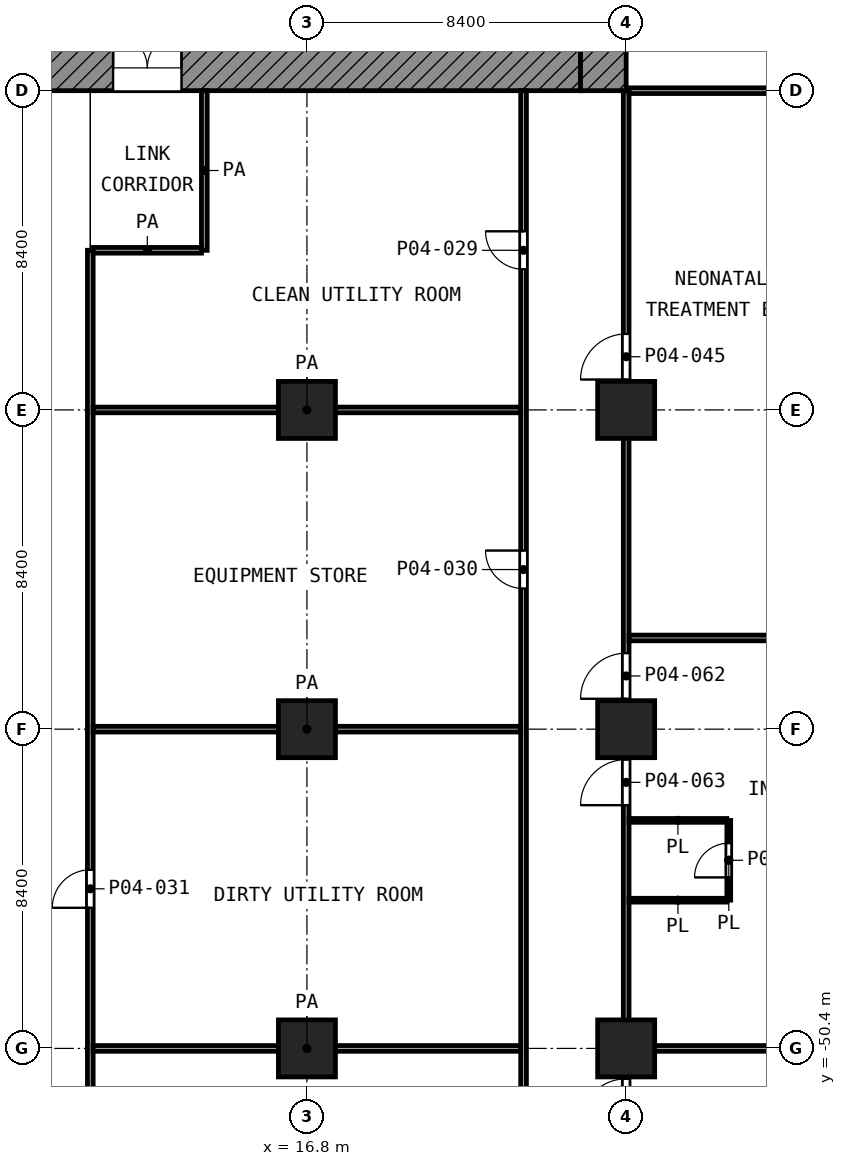
"""IFC4 building model, lengths in metres.
Left out: names, types, materials, properties, quantities, classifications, styles, units other than length and angle.
Written with IfcOpenShell. Run it as: python <this file> out.ifc"""

import sys

from ifc_helpers import new_model, si_unit, direction, frame, frame_2d, origin, origin_2d, place, context, subcontext, project, spatial, rectangle, extrude, element, fill, save


model = new_model("IFC4")
c1 = context("Model", 3, precision=1e-05, world=origin(), true_north=direction((0.0, 1.0)))
c2 = subcontext(c1, "Body", "Model", "MODEL_VIEW")
j1 = project(units=[si_unit("LENGTHUNIT", "METRE"), si_unit("PLANEANGLEUNIT", "RADIAN")], contexts=[c1])
p1 = place(None, origin())
s1 = spatial("IfcSite", under=j1, at=p1, CompositionType="ELEMENT")
p2 = place(p1, origin())
s2 = spatial("IfcBuilding", under=s1, at=p2, CompositionType="ELEMENT")
p3 = place(p2, frame((0.0, 0.0, 18.2)))
s3 = spatial("IfcBuildingStorey", under=s2, at=p3, CompositionType="ELEMENT", Elevation=18.2)
for number, where, z_axis, x_axis in (
    (1, (16.8, -33.6, 0.0), (0.0, 0.0, 1.0), (1.0, 0.0, 0.0)),
    (2, (25.2, -33.6, 0.0), (0.0, 0.0, 1.0), (1.0, 0.0, 0.0)),
    (3, (16.8, -42.0, 0.0), (0.0, 0.0, 1.0), (1.0, 0.0, 0.0)),
    (4, (25.2, -42.0, 0.0), (0.0, 0.0, 1.0), (1.0, 0.0, 0.0)),
    (5, (16.8, -50.4, 0.0), (0.0, 0.0, 1.0), (1.0, 0.0, 0.0)),
    (6, (25.2, -50.4, 0.0), (0.0, 0.0, 1.0), (1.0, 0.0, 0.0)),
):
    element("IfcColumn", number, at=place(p3, frame(where, z_axis=z_axis, x_axis=x_axis)), inside=s3, PredefinedType="COLUMN", context=c2, shape_type="SweptSolid", body=[
        extrude(rectangle(XDim=1.5, YDim=1.5, at=origin_2d()), origin(), (0.0, 0.0, 1.0), 5.6),
    ])
p4 = place(p3, frame((5.4, -24.6, 0.0), z_axis=(0.0, 0.0, 1.0), x_axis=(1.0, 0.0, 0.0)))
e7 = element("IfcWall", 7, at=p4, inside=s3, PredefinedType="SHEAR", context=c2, shape_type="SweptSolid", body=[
    extrude(rectangle(XDim=18.6, YDim=1.2, at=frame_2d((9.3, 0.0))), origin(), (0.0, 0.0, 1.0), 5.05),
])
p5 = place(p4, frame((6.3, 0.0, 0.0)))
e8 = element("IfcOpeningElement", 8, at=p5, cuts=e7, PredefinedType="OPENING", context=c2, shape_type="SweptSolid", body=[
    extrude(rectangle(XDim=1.8, YDim=2.1, at=frame_2d((0.9, 1.05))), frame((0.0, 0.61, 0.0), z_axis=(0.0, -1.0, 0.0), x_axis=(1.0, 0.0, 0.0)), (0.0, 0.0, 1.0), 1.22),
])
p6 = place(p3, frame((24.6, -25.2, 0.0), z_axis=(0.0, 0.0, 1.0), x_axis=(0.0, 1.0, 0.0)))
e9 = element("IfcWall", 9, at=p6, inside=s3, PredefinedType="SHEAR", context=c2, shape_type="SweptSolid", body=[
    extrude(rectangle(XDim=1.2, YDim=1.2, at=frame_2d((0.6, 0.0))), origin(), (0.0, 0.0, 1.0), 5.05),
])
p7 = place(p3, frame((25.275, -46.5, 0.0), z_axis=(0.0, 0.0, 1.0), x_axis=(1.0, 0.0, 0.0)))
e10 = element("IfcWall", 10, at=p7, inside=s3, PredefinedType="PARTITIONING", context=c2, shape_type="SweptSolid", body=[
    extrude(rectangle(XDim=2.574, YDim=0.1, at=frame_2d((1.287, 0.0))), origin(), (0.0, 0.0, 1.0), 5.05),
])
p8 = place(p3, frame((25.275, -44.4, 0.0), z_axis=(0.0, 0.0, 1.0), x_axis=(1.0, 0.0, 0.0)))
e11 = element("IfcWall", 11, at=p8, inside=s3, PredefinedType="PARTITIONING", context=c2, shape_type="SweptSolid", body=[
    extrude(rectangle(XDim=2.573, YDim=0.1, at=frame_2d((1.287, 0.0))), origin(), (0.0, 0.0, 1.0), 5.05),
])
p9 = place(p3, frame((27.9, -46.498, 0.0), z_axis=(0.0, 0.0, 1.0), x_axis=(0.0, 1.0, 0.0)))
e12 = element("IfcWall", 12, at=p9, inside=s3, PredefinedType="PARTITIONING", context=c2, shape_type="SweptSolid", body=[
    extrude(rectangle(XDim=2.096, YDim=0.1, at=frame_2d((1.048, 0.0))), origin(), (0.0, 0.0, 1.0), 5.05),
])
p10 = place(p9, frame((0.598, 0.0, 0.0)))
e13 = element("IfcOpeningElement", 13, at=p10, cuts=e12, PredefinedType="OPENING", context=c2, shape_type="SweptSolid", body=[
    extrude(rectangle(XDim=0.9, YDim=2.1, at=frame_2d((0.45, 1.05))), frame((0.0, 0.06, 0.0), z_axis=(0.0, -1.0, 0.0), x_axis=(1.0, 0.0, 0.0)), (0.0, 0.0, 1.0), 0.12),
])
p11 = place(p3, frame((11.175, -50.4, 0.0), z_axis=(0.0, 0.0, 1.0), x_axis=(1.0, 0.0, 0.0)))
e14 = element("IfcWall", 14, at=p11, inside=s3, PredefinedType="PARTITIONING", context=c2, shape_type="SweptSolid", body=[
    extrude(rectangle(XDim=11.25, YDim=0.15, at=frame_2d((5.625, 0.0))), origin(), (0.0, 0.0, 1.0), 5.05),
])
p12 = place(p3, frame((25.275, -50.4, 0.0), z_axis=(0.0, 0.0, 1.0), x_axis=(1.0, 0.0, 0.0)))
e15 = element("IfcWall", 15, at=p12, inside=s3, PredefinedType="PARTITIONING", context=c2, shape_type="SweptSolid", body=[
    extrude(rectangle(XDim=10.405, YDim=0.15, at=frame_2d((5.203, 0.0))), origin(), (0.0, 0.0, 1.0), 4.15),
])
p13 = place(p3, frame((11.175, -42.0, 0.0), z_axis=(0.0, 0.0, 1.0), x_axis=(1.0, 0.0, 0.0)))
e16 = element("IfcWall", 16, at=p13, inside=s3, PredefinedType="PARTITIONING", context=c2, shape_type="SweptSolid", body=[
    extrude(rectangle(XDim=11.25, YDim=0.15, at=frame_2d((5.625, 0.0))), origin(), (0.0, 0.0, 1.0), 5.05),
])
p14 = place(p3, frame((25.275, -39.6, 0.0), z_axis=(0.0, 0.0, 1.0), x_axis=(1.0, 0.0, 0.0)))
e17 = element("IfcWall", 17, at=p14, inside=s3, PredefinedType="PARTITIONING", context=c2, shape_type="SweptSolid", body=[
    extrude(rectangle(XDim=12.612, YDim=0.15, at=frame_2d((6.306, 0.0))), origin(), (0.0, 0.0, 1.0), 5.05),
])
p15 = place(p3, frame((11.175, -33.6, 0.0), z_axis=(0.0, 0.0, 1.0), x_axis=(1.0, 0.0, 0.0)))
e18 = element("IfcWall", 18, at=p15, inside=s3, PredefinedType="PARTITIONING", context=c2, shape_type="SweptSolid", body=[
    extrude(rectangle(XDim=11.25, YDim=0.15, at=frame_2d((5.625, 0.0))), origin(), (0.0, 0.0, 1.0), 5.05),
])
p16 = place(p3, frame((11.175, -29.4, 0.0), z_axis=(0.0, 0.0, 1.0), x_axis=(1.0, 0.0, 0.0)))
e19 = element("IfcWall", 19, at=p16, inside=s3, PredefinedType="PARTITIONING", context=c2, shape_type="SweptSolid", body=[
    extrude(rectangle(XDim=2.85, YDim=0.15, at=frame_2d((1.425, 0.0))), origin(), (0.0, 0.0, 1.0), 5.05),
])
p17 = place(p3, frame((25.275, -25.2, 0.0), z_axis=(0.0, 0.0, 1.0), x_axis=(1.0, 0.0, 0.0)))
e20 = element("IfcWall", 20, at=p17, inside=s3, PredefinedType="PARTITIONING", context=c2, shape_type="SweptSolid", body=[
    extrude(rectangle(XDim=32.325, YDim=0.15, at=frame_2d((16.163, 0.0))), origin(), (0.0, 0.0, 1.0), 5.05),
])
p18 = place(p17, frame((5.925, 0.0, 0.0)))
e21 = element("IfcOpeningElement", 21, at=p18, cuts=e20, PredefinedType="OPENING", context=c2, shape_type="SweptSolid", body=[
    extrude(rectangle(XDim=1.2, YDim=2.1, at=frame_2d((0.6, 1.05))), frame((0.0, 0.085, 0.0), z_axis=(0.0, -1.0, 0.0), x_axis=(1.0, 0.0, 0.0)), (0.0, 0.0, 1.0), 0.17),
])
p19 = place(p17, frame((9.675, 0.0, 0.0)))
e22 = element("IfcOpeningElement", 22, at=p19, cuts=e20, PredefinedType="OPENING", context=c2, shape_type="SweptSolid", body=[
    extrude(rectangle(XDim=1.2, YDim=2.1, at=frame_2d((0.6, 1.05))), frame((0.0, 0.085, 0.0), z_axis=(0.0, -1.0, 0.0), x_axis=(1.0, 0.0, 0.0)), (0.0, 0.0, 1.0), 0.17),
])
p20 = place(p17, frame((13.875, 0.0, 0.0)))
e23 = element("IfcOpeningElement", 23, at=p20, cuts=e20, PredefinedType="OPENING", context=c2, shape_type="SweptSolid", body=[
    extrude(rectangle(XDim=1.2, YDim=2.1, at=frame_2d((0.6, 1.05))), frame((0.0, 0.085, 0.0), z_axis=(0.0, -1.0, 0.0), x_axis=(1.0, 0.0, 0.0)), (0.0, 0.0, 1.0), 0.17),
])
p21 = place(p17, frame((17.725, 0.0, 0.0)))
e24 = element("IfcOpeningElement", 24, at=p21, cuts=e20, PredefinedType="OPENING", context=c2, shape_type="SweptSolid", body=[
    extrude(rectangle(XDim=1.2, YDim=2.1, at=frame_2d((0.6, 1.05))), frame((0.0, 0.085, 0.0), z_axis=(0.0, -1.0, 0.0), x_axis=(1.0, 0.0, 0.0)), (0.0, 0.0, 1.0), 0.17),
])
p22 = place(p17, frame((23.125, 0.0, 0.0)))
e25 = element("IfcOpeningElement", 25, at=p22, cuts=e20, PredefinedType="OPENING", context=c2, shape_type="SweptSolid", body=[
    extrude(rectangle(XDim=1.2, YDim=2.1, at=frame_2d((0.6, 1.05))), frame((0.0, 0.085, 0.0), z_axis=(0.0, -1.0, 0.0), x_axis=(1.0, 0.0, 0.0)), (0.0, 0.0, 1.0), 0.17),
])
p23 = place(p17, frame((21.525, 0.0, 0.0)))
e26 = element("IfcOpeningElement", 26, at=p23, cuts=e20, PredefinedType="OPENING", context=c2, shape_type="SweptSolid", body=[
    extrude(rectangle(XDim=1.2, YDim=2.1, at=frame_2d((0.6, 1.05))), frame((0.0, 0.085, 0.0), z_axis=(0.0, -1.0, 0.0), x_axis=(1.0, 0.0, 0.0)), (0.0, 0.0, 1.0), 0.17),
])
p24 = place(p3, frame((11.1, -81.3, 0.0), z_axis=(0.0, 0.0, 1.0), x_axis=(0.0, 1.0, 0.0)))
e27 = element("IfcWall", 27, at=p24, inside=s3, PredefinedType="PARTITIONING", context=c2, shape_type="SweptSolid", body=[
    extrude(rectangle(XDim=51.9, YDim=0.15, at=frame_2d((25.95, 0.0))), origin(), (0.0, 0.0, 1.0), 5.05),
])
p25 = place(p24, frame((34.6, 0.0, 0.0)))
e28 = element("IfcOpeningElement", 28, at=p25, cuts=e27, PredefinedType="OPENING", context=c2, shape_type="SweptSolid", body=[
    extrude(rectangle(XDim=1.0, YDim=2.1, at=frame_2d((0.5, 1.05))), frame((0.0, 0.085, 0.0), z_axis=(0.0, -1.0, 0.0), x_axis=(1.0, 0.0, 0.0)), (0.0, 0.0, 1.0), 0.17),
])
p26 = place(p24, frame((26.2, 0.0, 0.0)))
e29 = element("IfcOpeningElement", 29, at=p26, cuts=e27, PredefinedType="OPENING", context=c2, shape_type="SweptSolid", body=[
    extrude(rectangle(XDim=1.0, YDim=2.1, at=frame_2d((0.5, 1.05))), frame((0.0, 0.085, 0.0), z_axis=(0.0, -1.0, 0.0), x_axis=(1.0, 0.0, 0.0)), (0.0, 0.0, 1.0), 0.17),
])
p27 = place(p24, frame((13.75, 0.0, 0.0)))
e30 = element("IfcOpeningElement", 30, at=p27, cuts=e27, PredefinedType="OPENING", context=c2, shape_type="SweptSolid", body=[
    extrude(rectangle(XDim=1.0, YDim=2.1, at=frame_2d((0.5, 1.05))), frame((0.0, 0.085, 0.0), z_axis=(0.0, -1.0, 0.0), x_axis=(1.0, 0.0, 0.0)), (0.0, 0.0, 1.0), 0.17),
])
p28 = place(p3, frame((14.1, -29.4, 0.0), z_axis=(0.0, 0.0, 1.0), x_axis=(0.0, 1.0, 0.0)))
e31 = element("IfcWall", 31, at=p28, inside=s3, PredefinedType="PARTITIONING", context=c2, shape_type="SweptSolid", body=[
    extrude(rectangle(XDim=4.2, YDim=0.15, at=frame_2d((2.1, 0.0))), origin(), (0.0, 0.0, 1.0), 5.05),
])
p29 = place(p3, frame((22.5, -81.3, 0.0), z_axis=(0.0, 0.0, 1.0), x_axis=(0.0, 1.0, 0.0)))
e32 = element("IfcWall", 32, at=p29, inside=s3, PredefinedType="PARTITIONING", context=c2, shape_type="SweptSolid", body=[
    extrude(rectangle(XDim=56.1, YDim=0.15, at=frame_2d((28.05, 0.0))), origin(), (0.0, 0.0, 1.0), 5.05),
])
p30 = place(p29, frame((51.4, 0.0, 0.0)))
e33 = element("IfcOpeningElement", 33, at=p30, cuts=e32, PredefinedType="OPENING", context=c2, shape_type="SweptSolid", body=[
    extrude(rectangle(XDim=1.0, YDim=2.1, at=frame_2d((0.5, 1.05))), frame((0.0, 0.085, 0.0), z_axis=(0.0, -1.0, 0.0), x_axis=(1.0, 0.0, 0.0)), (0.0, 0.0, 1.0), 0.17),
])
p31 = place(p29, frame((43.0, 0.0, 0.0)))
e34 = element("IfcOpeningElement", 34, at=p31, cuts=e32, PredefinedType="OPENING", context=c2, shape_type="SweptSolid", body=[
    extrude(rectangle(XDim=1.0, YDim=2.1, at=frame_2d((0.5, 1.05))), frame((0.0, 0.085, 0.0), z_axis=(0.0, -1.0, 0.0), x_axis=(1.0, 0.0, 0.0)), (0.0, 0.0, 1.0), 0.17),
])
p32 = place(p29, frame((19.75, 0.0, 0.0)))
e35 = element("IfcOpeningElement", 35, at=p32, cuts=e32, PredefinedType="OPENING", context=c2, shape_type="SweptSolid", body=[
    extrude(rectangle(XDim=1.0, YDim=2.1, at=frame_2d((0.5, 1.05))), frame((0.0, 0.085, 0.0), z_axis=(0.0, -1.0, 0.0), x_axis=(1.0, 0.0, 0.0)), (0.0, 0.0, 1.0), 0.17),
])
p33 = place(p29, frame((5.5, 0.0, 0.0)))
e36 = element("IfcOpeningElement", 36, at=p33, cuts=e32, PredefinedType="OPENING", context=c2, shape_type="SweptSolid", body=[
    extrude(rectangle(XDim=1.0, YDim=2.1, at=frame_2d((0.5, 1.05))), frame((0.0, 0.085, 0.0), z_axis=(0.0, -1.0, 0.0), x_axis=(1.0, 0.0, 0.0)), (0.0, 0.0, 1.0), 0.17),
])
p34 = place(p3, frame((25.2, -81.3, 0.0), z_axis=(0.0, 0.0, 1.0), x_axis=(0.0, 1.0, 0.0)))
e37 = element("IfcWall", 37, at=p34, inside=s3, PredefinedType="PARTITIONING", context=c2, shape_type="SweptSolid", body=[
    extrude(rectangle(XDim=56.1, YDim=0.15, at=frame_2d((28.05, 0.0))), origin(), (0.0, 0.0, 1.0), 5.05),
])
p35 = place(p34, frame((48.5, 0.0, 0.0)))
e38 = element("IfcOpeningElement", 38, at=p35, cuts=e37, PredefinedType="OPENING", context=c2, shape_type="SweptSolid", body=[
    extrude(rectangle(XDim=1.2, YDim=2.1, at=frame_2d((0.6, 1.05))), frame((0.0, 0.085, 0.0), z_axis=(0.0, -1.0, 0.0), x_axis=(1.0, 0.0, 0.0)), (0.0, 0.0, 1.0), 0.17),
])
p36 = place(p34, frame((40.1, 0.0, 0.0)))
e39 = element("IfcOpeningElement", 39, at=p36, cuts=e37, PredefinedType="OPENING", context=c2, shape_type="SweptSolid", body=[
    extrude(rectangle(XDim=1.2, YDim=2.1, at=frame_2d((0.6, 1.05))), frame((0.0, 0.085, 0.0), z_axis=(0.0, -1.0, 0.0), x_axis=(1.0, 0.0, 0.0)), (0.0, 0.0, 1.0), 0.17),
])
p37 = place(p34, frame((37.3, 0.0, 0.0)))
e40 = element("IfcOpeningElement", 40, at=p37, cuts=e37, PredefinedType="OPENING", context=c2, shape_type="SweptSolid", body=[
    extrude(rectangle(XDim=1.2, YDim=2.1, at=frame_2d((0.6, 1.05))), frame((0.0, 0.085, 0.0), z_axis=(0.0, -1.0, 0.0), x_axis=(1.0, 0.0, 0.0)), (0.0, 0.0, 1.0), 0.17),
])
p38 = place(p34, frame((28.9, 0.0, 0.0)))
e41 = element("IfcOpeningElement", 41, at=p38, cuts=e37, PredefinedType="OPENING", context=c2, shape_type="SweptSolid", body=[
    extrude(rectangle(XDim=1.2, YDim=2.1, at=frame_2d((0.6, 1.05))), frame((0.0, 0.085, 0.0), z_axis=(0.0, -1.0, 0.0), x_axis=(1.0, 0.0, 0.0)), (0.0, 0.0, 1.0), 0.17),
])
p39 = place(p34, frame((23.3, 0.0, 0.0)))
e42 = element("IfcOpeningElement", 42, at=p39, cuts=e37, PredefinedType="OPENING", context=c2, shape_type="SweptSolid", body=[
    extrude(rectangle(XDim=1.2, YDim=2.1, at=frame_2d((0.6, 1.05))), frame((0.0, 0.085, 0.0), z_axis=(0.0, -1.0, 0.0), x_axis=(1.0, 0.0, 0.0)), (0.0, 0.0, 1.0), 0.17),
])
p40 = place(p34, frame((20.6, 0.0, 0.0)))
e43 = element("IfcOpeningElement", 43, at=p40, cuts=e37, PredefinedType="OPENING", context=c2, shape_type="SweptSolid", body=[
    extrude(rectangle(XDim=1.1, YDim=2.1, at=frame_2d((0.55, 1.05))), frame((0.0, 0.085, 0.0), z_axis=(0.0, -1.0, 0.0), x_axis=(1.0, 0.0, 0.0)), (0.0, 0.0, 1.0), 0.17),
])
p41 = place(p34, frame((14.9, 0.0, 0.0)))
e44 = element("IfcOpeningElement", 44, at=p41, cuts=e37, PredefinedType="OPENING", context=c2, shape_type="SweptSolid", body=[
    extrude(rectangle(XDim=1.1, YDim=2.1, at=frame_2d((0.55, 1.05))), frame((0.0, 0.085, 0.0), z_axis=(0.0, -1.0, 0.0), x_axis=(1.0, 0.0, 0.0)), (0.0, 0.0, 1.0), 0.17),
])
p42 = place(p34, frame((7.5, 0.0, 0.0)))
e45 = element("IfcOpeningElement", 45, at=p42, cuts=e37, PredefinedType="OPENING", context=c2, shape_type="SweptSolid", body=[
    extrude(rectangle(XDim=1.2, YDim=2.1, at=frame_2d((0.6, 1.05))), frame((0.0, 0.085, 0.0), z_axis=(0.0, -1.0, 0.0), x_axis=(1.0, 0.0, 0.0)), (0.0, 0.0, 1.0), 0.17),
])
p43 = place(p34, frame((11.7, 0.0, 0.0)))
e46 = element("IfcOpeningElement", 46, at=p43, cuts=e37, PredefinedType="OPENING", context=c2, shape_type="SweptSolid", body=[
    extrude(rectangle(XDim=1.2, YDim=2.1, at=frame_2d((0.6, 1.05))), frame((0.0, 0.085, 0.0), z_axis=(0.0, -1.0, 0.0), x_axis=(1.0, 0.0, 0.0)), (0.0, 0.0, 1.0), 0.17),
])
p44 = place(p34, frame((3.15, 0.0, 0.0)))
e47 = element("IfcOpeningElement", 47, at=p44, cuts=e37, PredefinedType="OPENING", context=c2, shape_type="SweptSolid", body=[
    extrude(rectangle(XDim=1.2, YDim=2.1, at=frame_2d((0.6, 1.05))), frame((0.0, 0.085, 0.0), z_axis=(0.0, -1.0, 0.0), x_axis=(1.0, 0.0, 0.0)), (0.0, 0.0, 1.0), 0.17),
])
p45 = place(p5, origin())
e48 = element("IfcDoor", 48, at=p45, inside=s3, OperationType="DOUBLE_DOOR_SINGLE_SWING", PredefinedType="DOOR", context=c2, shape_type="SweptSolid", body=[
    extrude(rectangle(XDim=1.8, YDim=2.1, at=frame_2d((0.9, 1.05))), frame((0.0, 0.025, 0.0), z_axis=(0.0, -1.0, 0.0), x_axis=(1.0, 0.0, 0.0)), (0.0, 0.0, 1.0), 0.05),
])
fill(e8, e48)
p46 = place(p35, origin())
e49 = element("IfcDoor", 49, at=p46, inside=s3, OperationType="SINGLE_SWING_LEFT", PredefinedType="DOOR", context=c2, shape_type="SweptSolid", body=[
    extrude(rectangle(XDim=1.2, YDim=2.1, at=frame_2d((0.6, 1.05))), frame((0.0, 0.025, 0.0), z_axis=(0.0, -1.0, 0.0), x_axis=(1.0, 0.0, 0.0)), (0.0, 0.0, 1.0), 0.05),
])
fill(e38, e49)
p47 = place(p30, origin())
e50 = element("IfcDoor", 50, at=p47, inside=s3, OperationType="SINGLE_SWING_RIGHT", PredefinedType="DOOR", context=c2, shape_type="SweptSolid", body=[
    extrude(rectangle(XDim=1.0, YDim=2.1, at=frame_2d((0.5, 1.05))), frame((0.0, 0.025, 0.0), z_axis=(0.0, -1.0, 0.0), x_axis=(1.0, 0.0, 0.0)), (0.0, 0.0, 1.0), 0.05),
])
fill(e33, e50)
p48 = place(p31, origin())
e51 = element("IfcDoor", 51, at=p48, inside=s3, OperationType="SINGLE_SWING_RIGHT", PredefinedType="DOOR", context=c2, shape_type="SweptSolid", body=[
    extrude(rectangle(XDim=1.0, YDim=2.1, at=frame_2d((0.5, 1.05))), frame((0.0, 0.025, 0.0), z_axis=(0.0, -1.0, 0.0), x_axis=(1.0, 0.0, 0.0)), (0.0, 0.0, 1.0), 0.05),
])
fill(e34, e51)
p49 = place(p25, origin())
e52 = element("IfcDoor", 52, at=p49, inside=s3, OperationType="SINGLE_SWING_LEFT", PredefinedType="DOOR", context=c2, shape_type="SweptSolid", body=[
    extrude(rectangle(XDim=1.0, YDim=2.1, at=frame_2d((0.5, 1.05))), frame((0.0, 0.025, 0.0), z_axis=(0.0, -1.0, 0.0), x_axis=(1.0, 0.0, 0.0)), (0.0, 0.0, 1.0), 0.05),
])
fill(e28, e52)
p50 = place(p36, origin())
e53 = element("IfcDoor", 53, at=p50, inside=s3, OperationType="SINGLE_SWING_LEFT", PredefinedType="DOOR", context=c2, shape_type="SweptSolid", body=[
    extrude(rectangle(XDim=1.2, YDim=2.1, at=frame_2d((0.6, 1.05))), frame((0.0, 0.025, 0.0), z_axis=(0.0, -1.0, 0.0), x_axis=(1.0, 0.0, 0.0)), (0.0, 0.0, 1.0), 0.05),
])
fill(e39, e53)
p51 = place(p37, origin())
e54 = element("IfcDoor", 54, at=p51, inside=s3, OperationType="SINGLE_SWING_LEFT", PredefinedType="DOOR", context=c2, shape_type="SweptSolid", body=[
    extrude(rectangle(XDim=1.2, YDim=2.1, at=frame_2d((0.6, 1.05))), frame((0.0, 0.025, 0.0), z_axis=(0.0, -1.0, 0.0), x_axis=(1.0, 0.0, 0.0)), (0.0, 0.0, 1.0), 0.05),
])
fill(e40, e54)
p52 = place(p10, origin())
e55 = element("IfcDoor", 55, at=p52, inside=s3, OperationType="SINGLE_SWING_LEFT", PredefinedType="DOOR", context=c2, shape_type="SweptSolid", body=[
    extrude(rectangle(XDim=0.9, YDim=2.1, at=frame_2d((0.45, 1.05))), frame((0.0, 0.025, 0.0), z_axis=(0.0, -1.0, 0.0), x_axis=(1.0, 0.0, 0.0)), (0.0, 0.0, 1.0), 0.05),
])
fill(e13, e55)
p53 = place(p38, origin())
e56 = element("IfcDoor", 56, at=p53, inside=s3, OperationType="SINGLE_SWING_LEFT", PredefinedType="DOOR", context=c2, shape_type="SweptSolid", body=[
    extrude(rectangle(XDim=1.2, YDim=2.1, at=frame_2d((0.6, 1.05))), frame((0.0, 0.025, 0.0), z_axis=(0.0, -1.0, 0.0), x_axis=(1.0, 0.0, 0.0)), (0.0, 0.0, 1.0), 0.05),
])
fill(e41, e56)
save(model, sys.argv[1])
